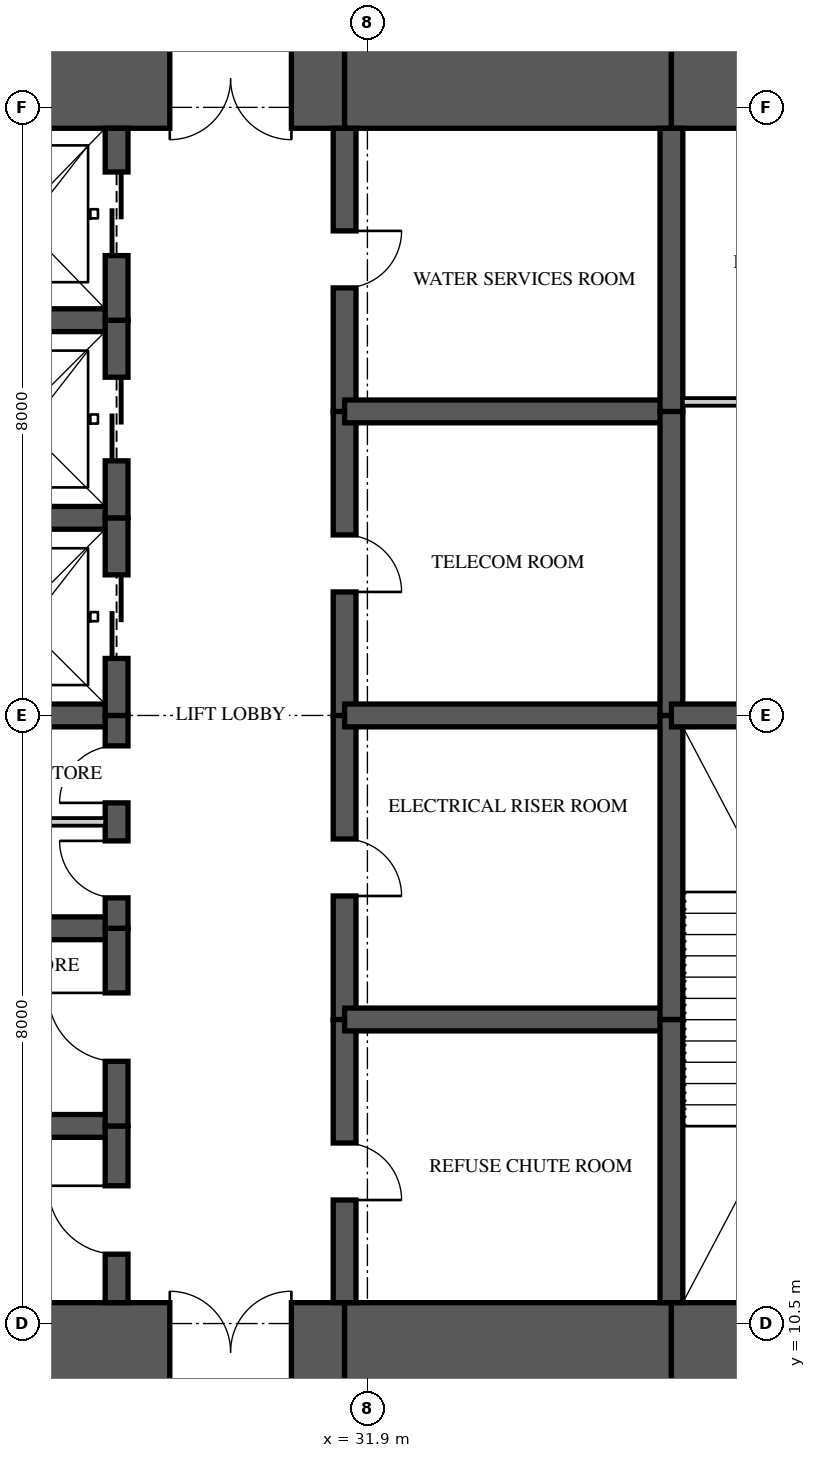
"""IFC4 building model, lengths in metres.
Left out: names, types, materials, properties, quantities, classifications, styles, units other than length and angle.
Written with IfcOpenShell. Run it as: python <this file> out.ifc"""

import sys

from ifc_helpers import new_model, si_unit, direction, frame, frame_2d, origin, place, context, subcontext, project, spatial, rectangle, extrude, element, fill, save


model = new_model("IFC4")
c1 = context("Model", 3, precision=1e-05, world=origin(), true_north=direction((0.0, 1.0)))
c2 = subcontext(c1, "Body", "Model", "MODEL_VIEW")
j1 = project(units=[si_unit("LENGTHUNIT", "METRE"), si_unit("PLANEANGLEUNIT", "RADIAN")], contexts=[c1])
p1 = place(None, origin())
s1 = spatial("IfcSite", under=j1, at=p1, CompositionType="ELEMENT")
p2 = place(p1, origin())
s2 = spatial("IfcBuilding", under=s1, at=p2, CompositionType="ELEMENT")
p3 = place(p2, frame((0.0, 0.0, 187.85)))
s3 = spatial("IfcBuildingStorey", under=s2, at=p3, CompositionType="ELEMENT", Elevation=187.85)
p4 = place(p3, frame((26.0, 10.125, 0.0), z_axis=(0.0, 0.0, 1.0), x_axis=(1.0, 0.0, 0.0)))
e1 = element("IfcWall", 1, at=p4, inside=s3, PredefinedType="SHEAR", context=c2, shape_type="SweptSolid", body=[
    extrude(rectangle(XDim=5.6, YDim=1.3, at=frame_2d((2.8, 0.0))), origin(), (0.0, 0.0, 1.0), 3.35),
])
p5 = place(p4, frame((3.3, 0.0, 0.0)))
e2 = element("IfcOpeningElement", 2, at=p5, cuts=e1, PredefinedType="OPENING", context=c2, shape_type="SweptSolid", body=[
    extrude(rectangle(XDim=1.6, YDim=2.1, at=frame_2d((0.8, 1.05))), frame((0.0, 0.66, 0.0), z_axis=(0.0, -1.0, 0.0), x_axis=(1.0, 0.0, 0.0)), (0.0, 0.0, 1.0), 1.32),
])
p6 = place(p3, frame((31.6, 10.125, 0.0), z_axis=(0.0, 0.0, 1.0), x_axis=(1.0, 0.0, 0.0)))
e3 = element("IfcWall", 3, at=p6, inside=s3, PredefinedType="SHEAR", context=c2, shape_type="SweptSolid", body=[
    extrude(rectangle(XDim=4.3, YDim=1.3, at=frame_2d((2.15, 0.0))), origin(), (0.0, 0.0, 1.0), 3.35),
])
p7 = place(p3, frame((35.9, 10.125, 0.0), z_axis=(0.0, 0.0, 1.0), x_axis=(1.0, 0.0, 0.0)))
e4 = element("IfcWall", 4, at=p7, inside=s3, PredefinedType="SHEAR", context=c2, shape_type="SweptSolid", body=[
    extrude(rectangle(XDim=8.25, YDim=1.3, at=frame_2d((4.125, 0.0))), origin(), (0.0, 0.0, 1.0), 3.35),
])
p8 = place(p7, frame((2.7, 0.0, 0.0)))
e5 = element("IfcOpeningElement", 5, at=p8, cuts=e4, PredefinedType="OPENING", context=c2, shape_type="SweptSolid", body=[
    extrude(rectangle(XDim=1.0, YDim=2.1, at=frame_2d((0.5, 1.05))), frame((0.0, 0.66, 0.0), z_axis=(0.0, -1.0, 0.0), x_axis=(1.0, 0.0, 0.0)), (0.0, 0.0, 1.0), 1.32),
])
p9 = place(p3, frame((44.15, 26.875, 0.0), z_axis=(0.0, 0.0, 1.0), x_axis=(-1.0, 0.0, 0.0)))
e6 = element("IfcWall", 6, at=p9, inside=s3, PredefinedType="SHEAR", context=c2, shape_type="SweptSolid", body=[
    extrude(rectangle(XDim=8.25, YDim=1.3, at=frame_2d((4.125, 0.0))), origin(), (0.0, 0.0, 1.0), 3.35),
])
p10 = place(p9, frame((5.65, 0.0, 0.0)))
e7 = element("IfcOpeningElement", 7, at=p10, cuts=e6, PredefinedType="OPENING", context=c2, shape_type="SweptSolid", body=[
    extrude(rectangle(XDim=0.9, YDim=2.1, at=frame_2d((0.45, 1.05))), frame((0.0, 0.66, 0.0), z_axis=(0.0, -1.0, 0.0), x_axis=(1.0, 0.0, 0.0)), (0.0, 0.0, 1.0), 1.32),
])
p11 = place(p3, frame((35.9, 26.875, 0.0), z_axis=(0.0, 0.0, 1.0), x_axis=(-1.0, 0.0, 0.0)))
e8 = element("IfcWall", 8, at=p11, inside=s3, PredefinedType="SHEAR", context=c2, shape_type="SweptSolid", body=[
    extrude(rectangle(XDim=4.3, YDim=1.3, at=frame_2d((2.15, 0.0))), origin(), (0.0, 0.0, 1.0), 3.35),
])
p12 = place(p3, frame((31.6, 26.875, 0.0), z_axis=(0.0, 0.0, 1.0), x_axis=(-1.0, 0.0, 0.0)))
e9 = element("IfcWall", 9, at=p12, inside=s3, PredefinedType="SHEAR", context=c2, shape_type="SweptSolid", body=[
    extrude(rectangle(XDim=5.6, YDim=1.3, at=frame_2d((2.8, 0.0))), origin(), (0.0, 0.0, 1.0), 3.35),
])
p13 = place(p12, frame((0.7, 0.0, 0.0)))
e10 = element("IfcOpeningElement", 10, at=p13, cuts=e9, PredefinedType="OPENING", context=c2, shape_type="SweptSolid", body=[
    extrude(rectangle(XDim=1.6, YDim=2.1, at=frame_2d((0.8, 1.05))), frame((0.0, 0.66, 0.0), z_axis=(0.0, -1.0, 0.0), x_axis=(1.0, 0.0, 0.0)), (0.0, 0.0, 1.0), 1.32),
])
p14 = place(p3, frame((28.6, 10.775, 0.0), z_axis=(0.0, 0.0, 1.0), x_axis=(0.0, 1.0, 0.0)))
e11 = element("IfcWall", 11, at=p14, inside=s3, PredefinedType="SHEAR", context=c2, shape_type="SweptSolid", body=[
    extrude(rectangle(XDim=2.325, YDim=0.3, at=frame_2d((1.163, 0.0))), origin(), (0.0, 0.0, 1.0), 3.35),
])
p15 = place(p14, frame((0.637, 0.0, 0.0)))
e12 = element("IfcOpeningElement", 12, at=p15, cuts=e11, PredefinedType="OPENING", context=c2, shape_type="SweptSolid", body=[
    extrude(rectangle(XDim=0.9, YDim=2.1, at=frame_2d((0.45, 1.05))), frame((0.0, 0.16, 0.0), z_axis=(0.0, -1.0, 0.0), x_axis=(1.0, 0.0, 0.0)), (0.0, 0.0, 1.0), 0.32),
])
p16 = place(p3, frame((28.6, 13.1, 0.0), z_axis=(0.0, 0.0, 1.0), x_axis=(0.0, 1.0, 0.0)))
e13 = element("IfcWall", 13, at=p16, inside=s3, PredefinedType="SHEAR", context=c2, shape_type="SweptSolid", body=[
    extrude(rectangle(XDim=2.6, YDim=0.3, at=frame_2d((1.3, 0.0))), origin(), (0.0, 0.0, 1.0), 3.35),
])
p17 = place(p16, frame((0.85, 0.0, 0.0)))
e14 = element("IfcOpeningElement", 14, at=p17, cuts=e13, PredefinedType="OPENING", context=c2, shape_type="SweptSolid", body=[
    extrude(rectangle(XDim=0.9, YDim=2.1, at=frame_2d((0.45, 1.05))), frame((0.0, 0.16, 0.0), z_axis=(0.0, -1.0, 0.0), x_axis=(1.0, 0.0, 0.0)), (0.0, 0.0, 1.0), 0.32),
])
p18 = place(p3, frame((28.6, 15.7, 0.0), z_axis=(0.0, 0.0, 1.0), x_axis=(0.0, 1.0, 0.0)))
e15 = element("IfcWall", 15, at=p18, inside=s3, PredefinedType="SHEAR", context=c2, shape_type="SweptSolid", body=[
    extrude(rectangle(XDim=2.8, YDim=0.3, at=frame_2d((1.4, 0.0))), origin(), (0.0, 0.0, 1.0), 3.35),
])
p19 = place(p18, frame((0.4, 0.0, 0.0)))
e16 = element("IfcOpeningElement", 16, at=p19, cuts=e15, PredefinedType="OPENING", context=c2, shape_type="SweptSolid", body=[
    extrude(rectangle(XDim=0.75, YDim=2.1, at=frame_2d((0.375, 1.05))), frame((0.0, 0.16, 0.0), z_axis=(0.0, -1.0, 0.0), x_axis=(1.0, 0.0, 0.0)), (0.0, 0.0, 1.0), 0.32),
])
p20 = place(p18, frame((1.65, 0.0, 0.0)))
e17 = element("IfcOpeningElement", 17, at=p20, cuts=e15, PredefinedType="OPENING", context=c2, shape_type="SweptSolid", body=[
    extrude(rectangle(XDim=0.75, YDim=2.1, at=frame_2d((0.375, 1.05))), frame((0.0, 0.16, 0.0), z_axis=(0.0, -1.0, 0.0), x_axis=(1.0, 0.0, 0.0)), (0.0, 0.0, 1.0), 0.32),
])
p21 = place(p3, frame((28.6, 18.5, 0.0), z_axis=(0.0, 0.0, 1.0), x_axis=(0.0, 1.0, 0.0)))
e18 = element("IfcWall", 18, at=p21, inside=s3, PredefinedType="SHEAR", context=c2, shape_type="SweptSolid", body=[
    extrude(rectangle(XDim=2.6, YDim=0.3, at=frame_2d((1.3, 0.0))), origin(), (0.0, 0.0, 1.0), 3.35),
])
p22 = place(p21, frame((0.75, 0.0, 0.0)))
e19 = element("IfcOpeningElement", 19, at=p22, cuts=e18, PredefinedType="OPENING", context=c2, shape_type="SweptSolid", body=[
    extrude(rectangle(XDim=1.1, YDim=2.1, at=frame_2d((0.55, 1.05))), frame((0.0, 0.16, 0.0), z_axis=(0.0, -1.0, 0.0), x_axis=(1.0, 0.0, 0.0)), (0.0, 0.0, 1.0), 0.32),
])
p23 = place(p3, frame((28.6, 21.1, 0.0), z_axis=(0.0, 0.0, 1.0), x_axis=(0.0, 1.0, 0.0)))
e20 = element("IfcWall", 20, at=p23, inside=s3, PredefinedType="SHEAR", context=c2, shape_type="SweptSolid", body=[
    extrude(rectangle(XDim=2.6, YDim=0.3, at=frame_2d((1.3, 0.0))), origin(), (0.0, 0.0, 1.0), 3.35),
])
p24 = place(p23, frame((0.75, 0.0, 0.0)))
e21 = element("IfcOpeningElement", 21, at=p24, cuts=e20, PredefinedType="OPENING", context=c2, shape_type="SweptSolid", body=[
    extrude(rectangle(XDim=1.1, YDim=2.1, at=frame_2d((0.55, 1.05))), frame((0.0, 0.16, 0.0), z_axis=(0.0, -1.0, 0.0), x_axis=(1.0, 0.0, 0.0)), (0.0, 0.0, 1.0), 0.32),
])
p25 = place(p3, frame((28.6, 23.7, 0.0), z_axis=(0.0, 0.0, 1.0), x_axis=(0.0, 1.0, 0.0)))
e22 = element("IfcWall", 22, at=p25, inside=s3, PredefinedType="SHEAR", context=c2, shape_type="SweptSolid", body=[
    extrude(rectangle(XDim=2.525, YDim=0.3, at=frame_2d((1.263, 0.0))), origin(), (0.0, 0.0, 1.0), 3.35),
])
p26 = place(p25, frame((0.85, 0.0, 0.0)))
e23 = element("IfcOpeningElement", 23, at=p26, cuts=e22, PredefinedType="OPENING", context=c2, shape_type="SweptSolid", body=[
    extrude(rectangle(XDim=1.1, YDim=2.1, at=frame_2d((0.55, 1.05))), frame((0.0, 0.16, 0.0), z_axis=(0.0, -1.0, 0.0), x_axis=(1.0, 0.0, 0.0)), (0.0, 0.0, 1.0), 0.32),
])
p27 = place(p3, frame((31.6, 10.775, 0.0), z_axis=(0.0, 0.0, 1.0), x_axis=(0.0, 1.0, 0.0)))
e24 = element("IfcWall", 24, at=p27, inside=s3, PredefinedType="SHEAR", context=c2, shape_type="SweptSolid", body=[
    extrude(rectangle(XDim=3.725, YDim=0.3, at=frame_2d((1.863, 0.0))), origin(), (0.0, 0.0, 1.0), 3.35),
])
p28 = place(p27, frame((1.35, 0.0, 0.0)))
e25 = element("IfcOpeningElement", 25, at=p28, cuts=e24, PredefinedType="OPENING", context=c2, shape_type="SweptSolid", body=[
    extrude(rectangle(XDim=0.75, YDim=2.1, at=frame_2d((0.375, 1.05))), frame((0.0, 0.16, 0.0), z_axis=(0.0, -1.0, 0.0), x_axis=(1.0, 0.0, 0.0)), (0.0, 0.0, 1.0), 0.32),
])
p29 = place(p3, frame((31.6, 14.5, 0.0), z_axis=(0.0, 0.0, 1.0), x_axis=(0.0, 1.0, 0.0)))
e26 = element("IfcWall", 26, at=p29, inside=s3, PredefinedType="SHEAR", context=c2, shape_type="SweptSolid", body=[
    extrude(rectangle(XDim=4.0, YDim=0.3, at=frame_2d((2.0, 0.0))), origin(), (0.0, 0.0, 1.0), 3.35),
])
p30 = place(p29, frame((1.625, 0.0, 0.0)))
e27 = element("IfcOpeningElement", 27, at=p30, cuts=e26, PredefinedType="OPENING", context=c2, shape_type="SweptSolid", body=[
    extrude(rectangle(XDim=0.75, YDim=2.1, at=frame_2d((0.375, 1.05))), frame((0.0, 0.16, 0.0), z_axis=(0.0, -1.0, 0.0), x_axis=(1.0, 0.0, 0.0)), (0.0, 0.0, 1.0), 0.32),
])
p31 = place(p3, frame((31.6, 18.5, 0.0), z_axis=(0.0, 0.0, 1.0), x_axis=(0.0, 1.0, 0.0)))
e28 = element("IfcWall", 28, at=p31, inside=s3, PredefinedType="SHEAR", context=c2, shape_type="SweptSolid", body=[
    extrude(rectangle(XDim=4.0, YDim=0.3, at=frame_2d((2.0, 0.0))), origin(), (0.0, 0.0, 1.0), 3.35),
])
p32 = place(p31, frame((1.625, 0.0, 0.0)))
e29 = element("IfcOpeningElement", 29, at=p32, cuts=e28, PredefinedType="OPENING", context=c2, shape_type="SweptSolid", body=[
    extrude(rectangle(XDim=0.75, YDim=2.1, at=frame_2d((0.375, 1.05))), frame((0.0, 0.16, 0.0), z_axis=(0.0, -1.0, 0.0), x_axis=(1.0, 0.0, 0.0)), (0.0, 0.0, 1.0), 0.32),
])
p33 = place(p3, frame((31.6, 22.5, 0.0), z_axis=(0.0, 0.0, 1.0), x_axis=(0.0, 1.0, 0.0)))
e30 = element("IfcWall", 30, at=p33, inside=s3, PredefinedType="SHEAR", context=c2, shape_type="SweptSolid", body=[
    extrude(rectangle(XDim=3.725, YDim=0.3, at=frame_2d((1.863, 0.0))), origin(), (0.0, 0.0, 1.0), 3.35),
])
p34 = place(p33, frame((1.625, 0.0, 0.0)))
e31 = element("IfcOpeningElement", 31, at=p34, cuts=e30, PredefinedType="OPENING", context=c2, shape_type="SweptSolid", body=[
    extrude(rectangle(XDim=0.75, YDim=2.1, at=frame_2d((0.375, 1.05))), frame((0.0, 0.16, 0.0), z_axis=(0.0, -1.0, 0.0), x_axis=(1.0, 0.0, 0.0)), (0.0, 0.0, 1.0), 0.32),
])
p35 = place(p3, frame((35.9, 10.775, 0.0), z_axis=(0.0, 0.0, 1.0), x_axis=(0.0, 1.0, 0.0)))
e32 = element("IfcWall", 32, at=p35, inside=s3, PredefinedType="SHEAR", context=c2, shape_type="SweptSolid", body=[
    extrude(rectangle(XDim=3.725, YDim=0.3, at=frame_2d((1.863, 0.0))), origin(), (0.0, 0.0, 1.0), 3.35),
])
for number, where, z_axis, x_axis in (
    (33, (35.9, 14.5, 0.0), (0.0, 0.0, 1.0), (0.0, 1.0, 0.0)),
    (34, (35.9, 18.5, 0.0), (0.0, 0.0, 1.0), (0.0, 1.0, 0.0)),
):
    element("IfcWall", number, at=place(p3, frame(where, z_axis=z_axis, x_axis=x_axis)), inside=s3, PredefinedType="SHEAR", context=c2, shape_type="SweptSolid", body=[
        extrude(rectangle(XDim=4.0, YDim=0.3, at=frame_2d((2.0, 0.0))), origin(), (0.0, 0.0, 1.0), 3.35),
    ])
p36 = place(p3, frame((35.9, 22.5, 0.0), z_axis=(0.0, 0.0, 1.0), x_axis=(0.0, 1.0, 0.0)))
e35 = element("IfcWall", 35, at=p36, inside=s3, PredefinedType="SHEAR", context=c2, shape_type="SweptSolid", body=[
    extrude(rectangle(XDim=3.725, YDim=0.3, at=frame_2d((1.863, 0.0))), origin(), (0.0, 0.0, 1.0), 3.35),
])
for number, where, z_axis, x_axis in (
    (36, (26.0, 13.1, 0.0), (0.0, 0.0, 1.0), (1.0, 0.0, 0.0)),
    (37, (26.0, 15.7, 0.0), (0.0, 0.0, 1.0), (1.0, 0.0, 0.0)),
    (38, (26.0, 18.5, 0.0), (0.0, 0.0, 1.0), (1.0, 0.0, 0.0)),
    (39, (26.0, 21.1, 0.0), (0.0, 0.0, 1.0), (1.0, 0.0, 0.0)),
    (40, (26.0, 23.7, 0.0), (0.0, 0.0, 1.0), (1.0, 0.0, 0.0)),
):
    element("IfcWall", number, at=place(p3, frame(where, z_axis=z_axis, x_axis=x_axis)), inside=s3, PredefinedType="SHEAR", context=c2, shape_type="SweptSolid", body=[
        extrude(rectangle(XDim=2.6, YDim=0.3, at=frame_2d((1.3, 0.0))), origin(), (0.0, 0.0, 1.0), 3.35),
    ])
for number, where, z_axis, x_axis in (
    (41, (31.6, 14.5, 0.0), (0.0, 0.0, 1.0), (1.0, 0.0, 0.0)),
    (42, (31.6, 18.5, 0.0), (0.0, 0.0, 1.0), (1.0, 0.0, 0.0)),
    (43, (31.6, 22.5, 0.0), (0.0, 0.0, 1.0), (1.0, 0.0, 0.0)),
):
    element("IfcWall", number, at=place(p3, frame(where, z_axis=z_axis, x_axis=x_axis)), inside=s3, PredefinedType="SHEAR", context=c2, shape_type="SweptSolid", body=[
        extrude(rectangle(XDim=4.3, YDim=0.3, at=frame_2d((2.15, 0.0))), origin(), (0.0, 0.0, 1.0), 3.35),
    ])
p37 = place(p3, frame((35.9, 18.5, 0.0), z_axis=(0.0, 0.0, 1.0), x_axis=(1.0, 0.0, 0.0)))
e44 = element("IfcWall", 44, at=p37, inside=s3, PredefinedType="SHEAR", context=c2, shape_type="SweptSolid", body=[
    extrude(rectangle(XDim=4.3, YDim=0.3, at=frame_2d((2.15, 0.0))), origin(), (0.0, 0.0, 1.0), 3.35),
])
p38 = place(p3, frame((36.05, 22.625, 0.0), z_axis=(0.0, 0.0, 1.0), x_axis=(1.0, 0.0, 0.0)))
e45 = element("IfcWall", 45, at=p38, inside=s3, PredefinedType="PARTITIONING", context=c2, shape_type="SweptSolid", body=[
    extrude(rectangle(XDim=4.0, YDim=0.1, at=frame_2d((2.0, 0.0))), origin(), (0.0, 0.0, 1.0), 3.11),
])
p39 = place(p38, frame((1.55, 0.0, 0.0)))
e46 = element("IfcOpeningElement", 46, at=p39, cuts=e45, PredefinedType="OPENING", context=c2, shape_type="SweptSolid", body=[
    extrude(rectangle(XDim=0.9, YDim=2.1, at=frame_2d((0.45, 1.05))), frame((0.0, 0.06, 0.0), z_axis=(0.0, -1.0, 0.0), x_axis=(1.0, 0.0, 0.0)), (0.0, 0.0, 1.0), 0.12),
])
p40 = place(p3, frame((26.15, 17.1, 0.0), z_axis=(0.0, 0.0, 1.0), x_axis=(1.0, 0.0, 0.0)))
e47 = element("IfcWall", 47, at=p40, inside=s3, PredefinedType="PARTITIONING", context=c2, shape_type="SweptSolid", body=[
    extrude(rectangle(XDim=2.3, YDim=0.1, at=frame_2d((1.15, 0.0))), origin(), (0.0, 0.0, 1.0), 3.11),
])
p41 = place(p22, origin())
e48 = element("IfcDoor", 48, at=p41, inside=s3, OperationType="SLIDING_TO_LEFT", PredefinedType="DOOR", context=c2, shape_type="SweptSolid", body=[
    extrude(rectangle(XDim=1.1, YDim=2.1, at=frame_2d((0.55, 1.05))), frame((0.0, 0.025, 0.0), z_axis=(0.0, -1.0, 0.0), x_axis=(1.0, 0.0, 0.0)), (0.0, 0.0, 1.0), 0.05),
])
fill(e19, e48)
p42 = place(p24, origin())
e49 = element("IfcDoor", 49, at=p42, inside=s3, OperationType="SLIDING_TO_LEFT", PredefinedType="DOOR", context=c2, shape_type="SweptSolid", body=[
    extrude(rectangle(XDim=1.1, YDim=2.1, at=frame_2d((0.55, 1.05))), frame((0.0, 0.025, 0.0), z_axis=(0.0, -1.0, 0.0), x_axis=(1.0, 0.0, 0.0)), (0.0, 0.0, 1.0), 0.05),
])
fill(e21, e49)
p43 = place(p26, origin())
e50 = element("IfcDoor", 50, at=p43, inside=s3, OperationType="SLIDING_TO_LEFT", PredefinedType="DOOR", context=c2, shape_type="SweptSolid", body=[
    extrude(rectangle(XDim=1.1, YDim=2.1, at=frame_2d((0.55, 1.05))), frame((0.0, 0.025, 0.0), z_axis=(0.0, -1.0, 0.0), x_axis=(1.0, 0.0, 0.0)), (0.0, 0.0, 1.0), 0.05),
])
fill(e23, e50)
p44 = place(p15, origin())
e51 = element("IfcDoor", 51, at=p44, inside=s3, OperationType="SINGLE_SWING_RIGHT", PredefinedType="DOOR", context=c2, shape_type="SweptSolid", body=[
    extrude(rectangle(XDim=0.9, YDim=2.1, at=frame_2d((0.45, 1.05))), frame((0.0, 0.025, 0.0), z_axis=(0.0, -1.0, 0.0), x_axis=(1.0, 0.0, 0.0)), (0.0, 0.0, 1.0), 0.05),
])
fill(e12, e51)
p45 = place(p17, origin())
e52 = element("IfcDoor", 52, at=p45, inside=s3, OperationType="SINGLE_SWING_RIGHT", PredefinedType="DOOR", context=c2, shape_type="SweptSolid", body=[
    extrude(rectangle(XDim=0.9, YDim=2.1, at=frame_2d((0.45, 1.05))), frame((0.0, 0.025, 0.0), z_axis=(0.0, -1.0, 0.0), x_axis=(1.0, 0.0, 0.0)), (0.0, 0.0, 1.0), 0.05),
])
fill(e14, e52)
p46 = place(p19, origin())
e53 = element("IfcDoor", 53, at=p46, inside=s3, OperationType="SINGLE_SWING_RIGHT", PredefinedType="DOOR", context=c2, shape_type="SweptSolid", body=[
    extrude(rectangle(XDim=0.75, YDim=2.1, at=frame_2d((0.375, 1.05))), frame((0.0, 0.025, 0.0), z_axis=(0.0, -1.0, 0.0), x_axis=(1.0, 0.0, 0.0)), (0.0, 0.0, 1.0), 0.05),
])
fill(e16, e53)
p47 = place(p20, origin())
e54 = element("IfcDoor", 54, at=p47, inside=s3, OperationType="SINGLE_SWING_LEFT", PredefinedType="DOOR", context=c2, shape_type="SweptSolid", body=[
    extrude(rectangle(XDim=0.75, YDim=2.1, at=frame_2d((0.375, 1.05))), frame((0.0, 0.025, 0.0), z_axis=(0.0, -1.0, 0.0), x_axis=(1.0, 0.0, 0.0)), (0.0, 0.0, 1.0), 0.05),
])
fill(e17, e54)
p48 = place(p5, origin())
e55 = element("IfcDoor", 55, at=p48, inside=s3, OperationType="DOUBLE_DOOR_SINGLE_SWING", PredefinedType="DOOR", context=c2, shape_type="SweptSolid", body=[
    extrude(rectangle(XDim=1.6, YDim=2.1, at=frame_2d((0.8, 1.05))), frame((0.0, 0.025, 0.0), z_axis=(0.0, -1.0, 0.0), x_axis=(1.0, 0.0, 0.0)), (0.0, 0.0, 1.0), 0.05),
])
fill(e2, e55)
p49 = place(p13, origin())
e56 = element("IfcDoor", 56, at=p49, inside=s3, OperationType="DOUBLE_DOOR_SINGLE_SWING", PredefinedType="DOOR", context=c2, shape_type="SweptSolid", body=[
    extrude(rectangle(XDim=1.6, YDim=2.1, at=frame_2d((0.8, 1.05))), frame((0.0, 0.025, 0.0), z_axis=(0.0, -1.0, 0.0), x_axis=(1.0, 0.0, 0.0)), (0.0, 0.0, 1.0), 0.05),
])
fill(e10, e56)
p50 = place(p28, frame((0.75, 0.0, 0.0), z_axis=(0.0, 0.0, 1.0), x_axis=(-1.0, 0.0, 0.0)))
e57 = element("IfcDoor", 57, at=p50, inside=s3, OperationType="SINGLE_SWING_RIGHT", PredefinedType="DOOR", context=c2, shape_type="SweptSolid", body=[
    extrude(rectangle(XDim=0.75, YDim=2.1, at=frame_2d((0.375, 1.05))), frame((0.0, 0.025, 0.0), z_axis=(0.0, -1.0, 0.0), x_axis=(1.0, 0.0, 0.0)), (0.0, 0.0, 1.0), 0.05),
])
fill(e25, e57)
p51 = place(p30, frame((0.75, 0.0, 0.0), z_axis=(0.0, 0.0, 1.0), x_axis=(-1.0, 0.0, 0.0)))
e58 = element("IfcDoor", 58, at=p51, inside=s3, OperationType="SINGLE_SWING_RIGHT", PredefinedType="DOOR", context=c2, shape_type="SweptSolid", body=[
    extrude(rectangle(XDim=0.75, YDim=2.1, at=frame_2d((0.375, 1.05))), frame((0.0, 0.025, 0.0), z_axis=(0.0, -1.0, 0.0), x_axis=(1.0, 0.0, 0.0)), (0.0, 0.0, 1.0), 0.05),
])
fill(e27, e58)
p52 = place(p32, frame((0.75, 0.0, 0.0), z_axis=(0.0, 0.0, 1.0), x_axis=(-1.0, 0.0, 0.0)))
e59 = element("IfcDoor", 59, at=p52, inside=s3, OperationType="SINGLE_SWING_RIGHT", PredefinedType="DOOR", context=c2, shape_type="SweptSolid", body=[
    extrude(rectangle(XDim=0.75, YDim=2.1, at=frame_2d((0.375, 1.05))), frame((0.0, 0.025, 0.0), z_axis=(0.0, -1.0, 0.0), x_axis=(1.0, 0.0, 0.0)), (0.0, 0.0, 1.0), 0.05),
])
fill(e29, e59)
p53 = place(p34, frame((0.75, 0.0, 0.0), z_axis=(0.0, 0.0, 1.0), x_axis=(-1.0, 0.0, 0.0)))
e60 = element("IfcDoor", 60, at=p53, inside=s3, OperationType="SINGLE_SWING_LEFT", PredefinedType="DOOR", context=c2, shape_type="SweptSolid", body=[
    extrude(rectangle(XDim=0.75, YDim=2.1, at=frame_2d((0.375, 1.05))), frame((0.0, 0.025, 0.0), z_axis=(0.0, -1.0, 0.0), x_axis=(1.0, 0.0, 0.0)), (0.0, 0.0, 1.0), 0.05),
])
fill(e31, e60)
save(model, sys.argv[1])
